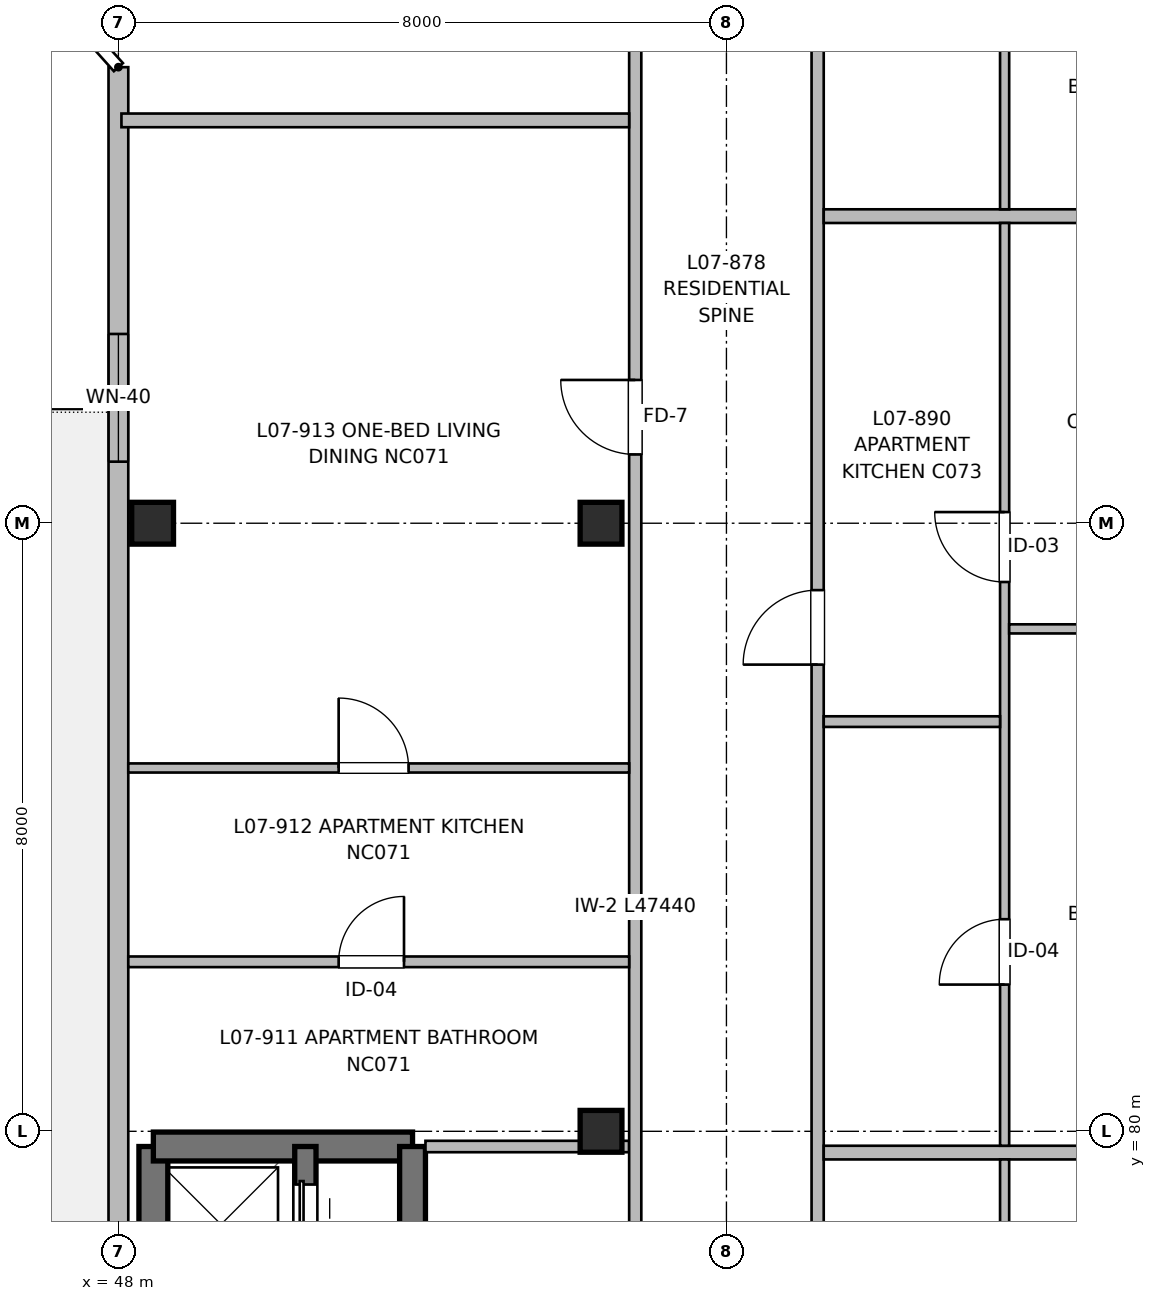
"""IFC4 building model, lengths in metres.
Left out: names, types, materials, properties, quantities, classifications, styles, units other than length and angle.
Written with IfcOpenShell. Run it as: python <this file> out.ifc"""

import sys

from ifc_helpers import new_model, si_unit, direction, frame, frame_2d, origin, origin_2d, place, context, subcontext, project, spatial, rectangle, extrude, element, fill, save


model = new_model("IFC4")
c1 = context("Model", 3, precision=1e-05, world=origin(), true_north=direction((0.0, 1.0)))
c2 = subcontext(c1, "Body", "Model", "MODEL_VIEW")
j1 = project(units=[si_unit("LENGTHUNIT", "METRE"), si_unit("PLANEANGLEUNIT", "RADIAN")], contexts=[c1])
p1 = place(None, origin())
s1 = spatial("IfcSite", under=j1, at=p1, CompositionType="ELEMENT")
p2 = place(p1, origin())
s2 = spatial("IfcBuilding", under=s1, at=p2, CompositionType="ELEMENT")
p3 = place(p2, frame((0.0, 0.0, 23.36)))
s3 = spatial("IfcBuildingStorey", under=s2, at=p3, CompositionType="ELEMENT", Elevation=23.36)
for number, where, z_axis, x_axis in (
    (1, (48.45, 88.0, 0.0), (0.0, 0.0, 1.0), (1.0, 0.0, 0.0)),
    (2, (54.35, 80.0, 0.0), (0.0, 0.0, 1.0), (1.0, 0.0, 0.0)),
    (3, (54.35, 88.0, 0.0), (0.0, 0.0, 1.0), (1.0, 0.0, 0.0)),
):
    element("IfcColumn", number, at=place(p3, frame(where, z_axis=z_axis, x_axis=x_axis)), inside=s3, PredefinedType="COLUMN", context=c2, shape_type="SweptSolid", body=[
        extrude(rectangle(XDim=0.55, YDim=0.55, at=origin_2d()), origin(), (0.0, 0.0, 1.0), 3.2),
    ])
p4 = place(p3, frame((48.46, 67.35, 0.0), z_axis=(0.0, 0.0, 1.0), x_axis=(0.0, 1.0, 0.0)))
e4 = element("IfcWall", 4, at=p4, inside=s3, PredefinedType="SHEAR", context=c2, shape_type="SweptSolid", body=[
    extrude(rectangle(XDim=12.45, YDim=0.38, at=frame_2d((6.225, 0.0))), origin(), (0.0, 0.0, 1.0), 3.2),
])
p5 = place(p4, frame((2.2, 0.0, 0.97)))
e5 = element("IfcOpeningElement", 5, at=p5, cuts=e4, PredefinedType="OPENING", context=c2, shape_type="SweptSolid", body=[
    extrude(rectangle(XDim=0.95, YDim=1.25, at=frame_2d((0.475, 0.625))), frame((0.0, 0.2, 0.0), z_axis=(0.0, -1.0, 0.0), x_axis=(1.0, 0.0, 0.0)), (0.0, 0.0, 1.0), 0.4),
])
p6 = place(p3, frame((48.46, 79.8, 0.0), z_axis=(0.0, 0.0, 1.0), x_axis=(1.0, 0.0, 0.0)))
e6 = element("IfcWall", 6, at=p6, inside=s3, PredefinedType="SHEAR", context=c2, shape_type="SweptSolid", body=[
    extrude(rectangle(XDim=3.41, YDim=0.38, at=frame_2d((1.705, 0.0))), origin(), (0.0, 0.0, 1.0), 3.2),
])
p7 = place(p3, frame((51.87, 79.8, 0.0), z_axis=(0.0, 0.0, 1.0), x_axis=(0.0, -1.0, 0.0)))
e7 = element("IfcWall", 7, at=p7, inside=s3, PredefinedType="SHEAR", context=c2, shape_type="SweptSolid", body=[
    extrude(rectangle(XDim=12.45, YDim=0.34, at=frame_2d((6.225, 0.0))), origin(), (0.0, 0.0, 1.0), 3.2),
])
p8 = place(p7, frame((10.85, 0.0, 0.0)))
e8 = element("IfcOpeningElement", 8, at=p8, cuts=e7, PredefinedType="OPENING", context=c2, shape_type="SweptSolid", body=[
    extrude(rectangle(XDim=1.05, YDim=2.15, at=frame_2d((0.525, 1.075))), frame((0.0, 0.18, 0.0), z_axis=(0.0, -1.0, 0.0), x_axis=(1.0, 0.0, 0.0)), (0.0, 0.0, 1.0), 0.36),
])
p9 = place(p3, frame((50.46, 74.55, 0.0), z_axis=(0.0, 0.0, 1.0), x_axis=(0.0, 1.0, 0.0)))
e9 = element("IfcWall", 9, at=p9, inside=s3, PredefinedType="SHEAR", context=c2, shape_type="SweptSolid", body=[
    extrude(rectangle(XDim=5.25, YDim=0.28, at=frame_2d((2.625, 0.0))), origin(), (0.0, 0.0, 1.0), 3.2),
])
p10 = place(p9, frame((1.15, 0.0, 0.0)))
e10 = element("IfcOpeningElement", 10, at=p10, cuts=e9, PredefinedType="OPENING", context=c2, shape_type="SweptSolid", body=[
    extrude(rectangle(XDim=1.0, YDim=2.15, at=frame_2d((0.5, 1.075))), frame((0.0, 0.15, 0.0), z_axis=(0.0, -1.0, 0.0), x_axis=(1.0, 0.0, 0.0)), (0.0, 0.0, 1.0), 0.3),
])
p11 = place(p9, frame((3.85, 0.0, 0.0)))
e11 = element("IfcOpeningElement", 11, at=p11, cuts=e9, PredefinedType="OPENING", context=c2, shape_type="SweptSolid", body=[
    extrude(rectangle(XDim=0.9, YDim=2.15, at=frame_2d((0.45, 1.075))), frame((0.0, 0.15, 0.0), z_axis=(0.0, -1.0, 0.0), x_axis=(1.0, 0.0, 0.0)), (0.0, 0.0, 1.0), 0.3),
])
p12 = place(p3, frame((48.0, 59.2, 0.0), z_axis=(0.0, 0.0, 1.0), x_axis=(0.0, 1.0, 0.0)))
e12 = element("IfcWall", 12, at=p12, inside=s3, PredefinedType="SOLIDWALL", context=c2, shape_type="SweptSolid", body=[
    extrude(rectangle(XDim=34.8, YDim=0.26, at=frame_2d((17.4, 0.0))), origin(), (0.0, 0.0, 1.0), 2.98),
])
p13 = place(p12, frame((2.95, 0.0, 0.0)))
e13 = element("IfcOpeningElement", 13, at=p13, cuts=e12, PredefinedType="OPENING", context=c2, shape_type="SweptSolid", body=[
    extrude(rectangle(XDim=1.2, YDim=2.2, at=frame_2d((0.6, 1.1))), frame((0.0, 0.14, 0.0), z_axis=(0.0, -1.0, 0.0), x_axis=(1.0, 0.0, 0.0)), (0.0, 0.0, 1.0), 0.28),
])
p14 = place(p12, frame((5.65, 0.0, 0.82)))
e14 = element("IfcOpeningElement", 14, at=p14, cuts=e12, PredefinedType="OPENING", context=c2, shape_type="SweptSolid", body=[
    extrude(rectangle(XDim=1.5, YDim=1.4, at=frame_2d((0.75, 0.7))), frame((0.0, 0.14, 0.0), z_axis=(0.0, -1.0, 0.0), x_axis=(1.0, 0.0, 0.0)), (0.0, 0.0, 1.0), 0.28),
])
p15 = place(p12, frame((12.075, 0.0, 0.72)))
e15 = element("IfcOpeningElement", 15, at=p15, cuts=e12, PredefinedType="OPENING", context=c2, shape_type="SweptSolid", body=[
    extrude(rectangle(XDim=1.95, YDim=1.5, at=frame_2d((0.975, 0.75))), frame((0.0, 0.14, 0.0), z_axis=(0.0, -1.0, 0.0), x_axis=(1.0, 0.0, 0.0)), (0.0, 0.0, 1.0), 0.28),
])
p16 = place(p12, frame((29.61, 0.0, 0.72)))
e16 = element("IfcOpeningElement", 16, at=p16, cuts=e12, PredefinedType="OPENING", context=c2, shape_type="SweptSolid", body=[
    extrude(rectangle(XDim=1.68, YDim=1.5, at=frame_2d((0.84, 0.75))), frame((0.0, 0.14, 0.0), z_axis=(0.0, -1.0, 0.0), x_axis=(1.0, 0.0, 0.0)), (0.0, 0.0, 1.0), 0.28),
])
p17 = place(p3, frame((52.04, 79.8, 0.0), z_axis=(0.0, 0.0, 1.0), x_axis=(1.0, 0.0, 0.0)))
e17 = element("IfcWall", 17, at=p17, inside=s3, PredefinedType="PARTITIONING", context=c2, shape_type="SweptSolid", body=[
    extrude(rectangle(XDim=2.68, YDim=0.15, at=frame_2d((1.34, 0.0))), origin(), (0.0, 0.0, 1.0), 2.935),
])
p18 = place(p3, frame((54.8, 59.36, 0.0), z_axis=(0.0, 0.0, 1.0), x_axis=(0.0, 1.0, 0.0)))
e18 = element("IfcWall", 18, at=p18, inside=s3, PredefinedType="PARTITIONING", context=c2, shape_type="SweptSolid", body=[
    extrude(rectangle(XDim=47.44, YDim=0.16, at=frame_2d((23.72, 0.0))), origin(), (0.0, 0.0, 1.0), 2.935),
])
p19 = place(p18, frame((9.64, 0.0, 0.0)))
e19 = element("IfcOpeningElement", 19, at=p19, cuts=e18, PredefinedType="OPENING", context=c2, shape_type="SweptSolid", body=[
    extrude(rectangle(XDim=1.1, YDim=2.15, at=frame_2d((0.55, 1.075))), frame((0.0, 0.09, 0.0), z_axis=(0.0, -1.0, 0.0), x_axis=(1.0, 0.0, 0.0)), (0.0, 0.0, 1.0), 0.18),
])
p20 = place(p18, frame((16.04, 0.0, 0.0)))
e20 = element("IfcOpeningElement", 20, at=p20, cuts=e18, PredefinedType="OPENING", context=c2, shape_type="SweptSolid", body=[
    extrude(rectangle(XDim=1.6, YDim=2.15, at=frame_2d((0.8, 1.075))), frame((0.0, 0.09, 0.0), z_axis=(0.0, -1.0, 0.0), x_axis=(1.0, 0.0, 0.0)), (0.0, 0.0, 1.0), 0.18),
])
p21 = place(p18, frame((1.8, 0.0, 0.0)))
e21 = element("IfcOpeningElement", 21, at=p21, cuts=e18, PredefinedType="OPENING", context=c2, shape_type="SweptSolid", body=[
    extrude(rectangle(XDim=0.96, YDim=2.15, at=frame_2d((0.48, 1.075))), frame((0.0, 0.09, 0.0), z_axis=(0.0, -1.0, 0.0), x_axis=(1.0, 0.0, 0.0)), (0.0, 0.0, 1.0), 0.18),
])
p22 = place(p18, frame((29.545, 0.0, 0.0)))
e22 = element("IfcOpeningElement", 22, at=p22, cuts=e18, PredefinedType="OPENING", context=c2, shape_type="SweptSolid", body=[
    extrude(rectangle(XDim=0.98, YDim=2.15, at=frame_2d((0.49, 1.075))), frame((0.0, 0.09, 0.0), z_axis=(0.0, -1.0, 0.0), x_axis=(1.0, 0.0, 0.0)), (0.0, 0.0, 1.0), 0.18),
])
p23 = place(p18, frame((37.755, 0.0, 0.0)))
e23 = element("IfcOpeningElement", 23, at=p23, cuts=e18, PredefinedType="OPENING", context=c2, shape_type="SweptSolid", body=[
    extrude(rectangle(XDim=0.98, YDim=2.15, at=frame_2d((0.49, 1.075))), frame((0.0, 0.09, 0.0), z_axis=(0.0, -1.0, 0.0), x_axis=(1.0, 0.0, 0.0)), (0.0, 0.0, 1.0), 0.18),
])
p24 = place(p3, frame((57.2, 59.36, 0.0), z_axis=(0.0, 0.0, 1.0), x_axis=(0.0, 1.0, 0.0)))
e24 = element("IfcWall", 24, at=p24, inside=s3, PredefinedType="PARTITIONING", context=c2, shape_type="SweptSolid", body=[
    extrude(rectangle(XDim=47.44, YDim=0.16, at=frame_2d((23.72, 0.0))), origin(), (0.0, 0.0, 1.0), 2.935),
])
p25 = place(p24, frame((5.29, 0.0, 0.0)))
e25 = element("IfcOpeningElement", 25, at=p25, cuts=e24, PredefinedType="OPENING", context=c2, shape_type="SweptSolid", body=[
    extrude(rectangle(XDim=0.98, YDim=2.15, at=frame_2d((0.49, 1.075))), frame((0.0, 0.09, 0.0), z_axis=(0.0, -1.0, 0.0), x_axis=(1.0, 0.0, 0.0)), (0.0, 0.0, 1.0), 0.18),
])
p26 = place(p24, frame((15.5, 0.0, 0.0)))
e26 = element("IfcOpeningElement", 26, at=p26, cuts=e24, PredefinedType="OPENING", context=c2, shape_type="SweptSolid", body=[
    extrude(rectangle(XDim=1.02, YDim=2.15, at=frame_2d((0.51, 1.075))), frame((0.0, 0.09, 0.0), z_axis=(0.0, -1.0, 0.0), x_axis=(1.0, 0.0, 0.0)), (0.0, 0.0, 1.0), 0.18),
])
p27 = place(p24, frame((26.78, 0.0, 0.0)))
e27 = element("IfcOpeningElement", 27, at=p27, cuts=e24, PredefinedType="OPENING", context=c2, shape_type="SweptSolid", body=[
    extrude(rectangle(XDim=0.98, YDim=2.15, at=frame_2d((0.49, 1.075))), frame((0.0, 0.09, 0.0), z_axis=(0.0, -1.0, 0.0), x_axis=(1.0, 0.0, 0.0)), (0.0, 0.0, 1.0), 0.18),
])
p28 = place(p24, frame((40.23, 0.0, 0.0)))
e28 = element("IfcOpeningElement", 28, at=p28, cuts=e24, PredefinedType="OPENING", context=c2, shape_type="SweptSolid", body=[
    extrude(rectangle(XDim=0.98, YDim=2.15, at=frame_2d((0.49, 1.075))), frame((0.0, 0.09, 0.0), z_axis=(0.0, -1.0, 0.0), x_axis=(1.0, 0.0, 0.0)), (0.0, 0.0, 1.0), 0.18),
])
p29 = place(p3, frame((57.28, 79.72, 0.0), z_axis=(0.0, 0.0, 1.0), x_axis=(1.0, 0.0, 0.0)))
e29 = element("IfcWall", 29, at=p29, inside=s3, PredefinedType="PARTITIONING", context=c2, shape_type="SweptSolid", body=[
    extrude(rectangle(XDim=6.59, YDim=0.18, at=frame_2d((3.295, 0.0))), origin(), (0.0, 0.0, 1.0), 2.935),
])
p30 = place(p3, frame((57.28, 92.04, 0.0), z_axis=(0.0, 0.0, 1.0), x_axis=(1.0, 0.0, 0.0)))
e30 = element("IfcWall", 30, at=p30, inside=s3, PredefinedType="PARTITIONING", context=c2, shape_type="SweptSolid", body=[
    extrude(rectangle(XDim=9.91, YDim=0.18, at=frame_2d((4.955, 0.0))), origin(), (0.0, 0.0, 1.0), 2.935),
])
p31 = place(p3, frame((59.66, 69.4, 0.0), z_axis=(0.0, 0.0, 1.0), x_axis=(0.0, 1.0, 0.0)))
e31 = element("IfcWall", 31, at=p31, inside=s3, PredefinedType="PARTITIONING", context=c2, shape_type="SweptSolid", body=[
    extrude(rectangle(XDim=10.23, YDim=0.12, at=frame_2d((5.115, 0.0))), origin(), (0.0, 0.0, 1.0), 2.935),
])
p32 = place(p31, frame((1.79, 0.0, 0.0)))
e32 = element("IfcOpeningElement", 32, at=p32, cuts=e31, PredefinedType="OPENING", context=c2, shape_type="SweptSolid", body=[
    extrude(rectangle(XDim=0.94, YDim=2.1, at=frame_2d((0.47, 1.05))), frame((0.0, 0.07, 0.0), z_axis=(0.0, -1.0, 0.0), x_axis=(1.0, 0.0, 0.0)), (0.0, 0.0, 1.0), 0.14),
])
p33 = place(p31, frame((6.256, 0.0, 0.0)))
e33 = element("IfcOpeningElement", 33, at=p33, cuts=e31, PredefinedType="OPENING", context=c2, shape_type="SweptSolid", body=[
    extrude(rectangle(XDim=0.92, YDim=2.1, at=frame_2d((0.46, 1.05))), frame((0.0, 0.07, 0.0), z_axis=(0.0, -1.0, 0.0), x_axis=(1.0, 0.0, 0.0)), (0.0, 0.0, 1.0), 0.14),
])
p34 = place(p3, frame((59.66, 79.81, 0.0), z_axis=(0.0, 0.0, 1.0), x_axis=(0.0, 1.0, 0.0)))
e34 = element("IfcWall", 34, at=p34, inside=s3, PredefinedType="PARTITIONING", context=c2, shape_type="SweptSolid", body=[
    extrude(rectangle(XDim=12.14, YDim=0.12, at=frame_2d((6.07, 0.0))), origin(), (0.0, 0.0, 1.0), 2.935),
])
p35 = place(p34, frame((2.12, 0.0, 0.0)))
e35 = element("IfcOpeningElement", 35, at=p35, cuts=e34, PredefinedType="OPENING", context=c2, shape_type="SweptSolid", body=[
    extrude(rectangle(XDim=0.86, YDim=2.1, at=frame_2d((0.43, 1.05))), frame((0.0, 0.07, 0.0), z_axis=(0.0, -1.0, 0.0), x_axis=(1.0, 0.0, 0.0)), (0.0, 0.0, 1.0), 0.14),
])
p36 = place(p34, frame((7.417, 0.0, 0.0)))
e36 = element("IfcOpeningElement", 36, at=p36, cuts=e34, PredefinedType="OPENING", context=c2, shape_type="SweptSolid", body=[
    extrude(rectangle(XDim=0.92, YDim=2.1, at=frame_2d((0.46, 1.05))), frame((0.0, 0.07, 0.0), z_axis=(0.0, -1.0, 0.0), x_axis=(1.0, 0.0, 0.0)), (0.0, 0.0, 1.0), 0.14),
])
p37 = place(p3, frame((57.28, 85.39, 0.0), z_axis=(0.0, 0.0, 1.0), x_axis=(1.0, 0.0, 0.0)))
e37 = element("IfcWall", 37, at=p37, inside=s3, PredefinedType="PARTITIONING", context=c2, shape_type="SweptSolid", body=[
    extrude(rectangle(XDim=2.32, YDim=0.14, at=frame_2d((1.16, 0.0))), origin(), (0.0, 0.0, 1.0), 2.935),
])
p38 = place(p3, frame((59.72, 86.61, 0.0), z_axis=(0.0, 0.0, 1.0), x_axis=(1.0, 0.0, 0.0)))
e38 = element("IfcWall", 38, at=p38, inside=s3, PredefinedType="PARTITIONING", context=c2, shape_type="SweptSolid", body=[
    extrude(rectangle(XDim=4.15, YDim=0.12, at=frame_2d((2.075, 0.0))), origin(), (0.0, 0.0, 1.0), 2.935),
])
p39 = place(p38, frame((1.625, 0.0, 0.0)))
e39 = element("IfcOpeningElement", 39, at=p39, cuts=e38, PredefinedType="OPENING", context=c2, shape_type="SweptSolid", body=[
    extrude(rectangle(XDim=0.9, YDim=2.1, at=frame_2d((0.45, 1.05))), frame((0.0, 0.07, 0.0), z_axis=(0.0, -1.0, 0.0), x_axis=(1.0, 0.0, 0.0)), (0.0, 0.0, 1.0), 0.14),
])
p40 = place(p3, frame((59.66, 92.13, 0.0), z_axis=(0.0, 0.0, 1.0), x_axis=(0.0, 1.0, 0.0)))
e40 = element("IfcWall", 40, at=p40, inside=s3, PredefinedType="PARTITIONING", context=c2, shape_type="SweptSolid", body=[
    extrude(rectangle(XDim=14.59, YDim=0.12, at=frame_2d((7.295, 0.0))), origin(), (0.0, 0.0, 1.0), 2.935),
])
p41 = place(p40, frame((2.55, 0.0, 0.0)))
e41 = element("IfcOpeningElement", 41, at=p41, cuts=e40, PredefinedType="OPENING", context=c2, shape_type="SweptSolid", body=[
    extrude(rectangle(XDim=0.86, YDim=2.1, at=frame_2d((0.43, 1.05))), frame((0.0, 0.07, 0.0), z_axis=(0.0, -1.0, 0.0), x_axis=(1.0, 0.0, 0.0)), (0.0, 0.0, 1.0), 0.14),
])
p42 = place(p40, frame((8.917, 0.0, 0.0)))
e42 = element("IfcOpeningElement", 42, at=p42, cuts=e40, PredefinedType="OPENING", context=c2, shape_type="SweptSolid", body=[
    extrude(rectangle(XDim=0.92, YDim=2.1, at=frame_2d((0.46, 1.05))), frame((0.0, 0.07, 0.0), z_axis=(0.0, -1.0, 0.0), x_axis=(1.0, 0.0, 0.0)), (0.0, 0.0, 1.0), 0.14),
])
p43 = place(p3, frame((48.04, 93.3, 0.0), z_axis=(0.0, 0.0, 1.0), x_axis=(1.0, 0.0, 0.0)))
e43 = element("IfcWall", 43, at=p43, inside=s3, PredefinedType="PARTITIONING", context=c2, shape_type="SweptSolid", body=[
    extrude(rectangle(XDim=6.68, YDim=0.18, at=frame_2d((3.34, 0.0))), origin(), (0.0, 0.0, 1.0), 2.935),
])
p44 = place(p3, frame((48.13, 82.23, 0.0), z_axis=(0.0, 0.0, 1.0), x_axis=(1.0, 0.0, 0.0)))
e44 = element("IfcWall", 44, at=p44, inside=s3, PredefinedType="PARTITIONING", context=c2, shape_type="SweptSolid", body=[
    extrude(rectangle(XDim=6.59, YDim=0.14, at=frame_2d((3.295, 0.0))), origin(), (0.0, 0.0, 1.0), 2.935),
])
p45 = place(p44, frame((2.768, 0.0, 0.0)))
e45 = element("IfcOpeningElement", 45, at=p45, cuts=e44, PredefinedType="OPENING", context=c2, shape_type="SweptSolid", body=[
    extrude(rectangle(XDim=0.86, YDim=2.1, at=frame_2d((0.43, 1.05))), frame((0.0, 0.08, 0.0), z_axis=(0.0, -1.0, 0.0), x_axis=(1.0, 0.0, 0.0)), (0.0, 0.0, 1.0), 0.16),
])
p46 = place(p3, frame((48.13, 84.78, 0.0), z_axis=(0.0, 0.0, 1.0), x_axis=(1.0, 0.0, 0.0)))
e46 = element("IfcWall", 46, at=p46, inside=s3, PredefinedType="PARTITIONING", context=c2, shape_type="SweptSolid", body=[
    extrude(rectangle(XDim=6.59, YDim=0.12, at=frame_2d((3.295, 0.0))), origin(), (0.0, 0.0, 1.0), 2.935),
])
p47 = place(p46, frame((2.768, 0.0, 0.0)))
e47 = element("IfcOpeningElement", 47, at=p47, cuts=e46, PredefinedType="OPENING", context=c2, shape_type="SweptSolid", body=[
    extrude(rectangle(XDim=0.92, YDim=2.1, at=frame_2d((0.46, 1.05))), frame((0.0, 0.07, 0.0), z_axis=(0.0, -1.0, 0.0), x_axis=(1.0, 0.0, 0.0)), (0.0, 0.0, 1.0), 0.14),
])
p48 = place(p11, origin())
e48 = element("IfcDoor", 48, at=p48, inside=s3, OperationType="SLIDING_TO_RIGHT", PredefinedType="DOOR", context=c2, shape_type="SweptSolid", body=[
    extrude(rectangle(XDim=0.9, YDim=2.15, at=frame_2d((0.45, 1.075))), frame((0.0, 0.025, 0.0), z_axis=(0.0, -1.0, 0.0), x_axis=(1.0, 0.0, 0.0)), (0.0, 0.0, 1.0), 0.05),
])
fill(e11, e48)
p49 = place(p16, origin())
e49 = element("IfcWindow", 49, at=p49, inside=s3, PartitioningType="SINGLE_PANEL", PredefinedType="WINDOW", context=c2, shape_type="SweptSolid", body=[
    extrude(rectangle(XDim=1.68, YDim=1.5, at=frame_2d((0.84, 0.75))), frame((0.0, 0.03, 0.0), z_axis=(0.0, -1.0, 0.0), x_axis=(1.0, 0.0, 0.0)), (0.0, 0.0, 1.0), 0.06),
])
fill(e16, e49)
p50 = place(p35, origin())
e50 = element("IfcDoor", 50, at=p50, inside=s3, OperationType="SINGLE_SWING_LEFT", PredefinedType="DOOR", context=c2, shape_type="SweptSolid", body=[
    extrude(rectangle(XDim=0.86, YDim=2.1, at=frame_2d((0.43, 1.05))), frame((0.0, 0.025, 0.0), z_axis=(0.0, -1.0, 0.0), x_axis=(1.0, 0.0, 0.0)), (0.0, 0.0, 1.0), 0.05),
])
fill(e35, e50)
p51 = place(p36, origin())
e51 = element("IfcDoor", 51, at=p51, inside=s3, OperationType="SINGLE_SWING_RIGHT", PredefinedType="DOOR", context=c2, shape_type="SweptSolid", body=[
    extrude(rectangle(XDim=0.92, YDim=2.1, at=frame_2d((0.46, 1.05))), frame((0.0, 0.025, 0.0), z_axis=(0.0, -1.0, 0.0), x_axis=(1.0, 0.0, 0.0)), (0.0, 0.0, 1.0), 0.05),
])
fill(e36, e51)
p52 = place(p27, origin())
e52 = element("IfcDoor", 52, at=p52, inside=s3, OperationType="SINGLE_SWING_LEFT", PredefinedType="DOOR", context=c2, shape_type="SweptSolid", body=[
    extrude(rectangle(XDim=0.98, YDim=2.15, at=frame_2d((0.49, 1.075))), frame((0.0, 0.025, 0.0), z_axis=(0.0, -1.0, 0.0), x_axis=(1.0, 0.0, 0.0)), (0.0, 0.0, 1.0), 0.05),
])
fill(e27, e52)
p53 = place(p45, origin())
e53 = element("IfcDoor", 53, at=p53, inside=s3, OperationType="SINGLE_SWING_RIGHT", PredefinedType="DOOR", context=c2, shape_type="SweptSolid", body=[
    extrude(rectangle(XDim=0.86, YDim=2.1, at=frame_2d((0.43, 1.05))), frame((0.0, 0.025, 0.0), z_axis=(0.0, -1.0, 0.0), x_axis=(1.0, 0.0, 0.0)), (0.0, 0.0, 1.0), 0.05),
])
fill(e45, e53)
p54 = place(p47, origin())
e54 = element("IfcDoor", 54, at=p54, inside=s3, OperationType="SINGLE_SWING_LEFT", PredefinedType="DOOR", context=c2, shape_type="SweptSolid", body=[
    extrude(rectangle(XDim=0.92, YDim=2.1, at=frame_2d((0.46, 1.05))), frame((0.0, 0.025, 0.0), z_axis=(0.0, -1.0, 0.0), x_axis=(1.0, 0.0, 0.0)), (0.0, 0.0, 1.0), 0.05),
])
fill(e47, e54)
p55 = place(p22, origin())
e55 = element("IfcDoor", 55, at=p55, inside=s3, OperationType="SINGLE_SWING_RIGHT", PredefinedType="DOOR", context=c2, shape_type="SweptSolid", body=[
    extrude(rectangle(XDim=0.98, YDim=2.15, at=frame_2d((0.49, 1.075))), frame((0.0, 0.025, 0.0), z_axis=(0.0, -1.0, 0.0), x_axis=(1.0, 0.0, 0.0)), (0.0, 0.0, 1.0), 0.05),
])
fill(e22, e55)
save(model, sys.argv[1])
